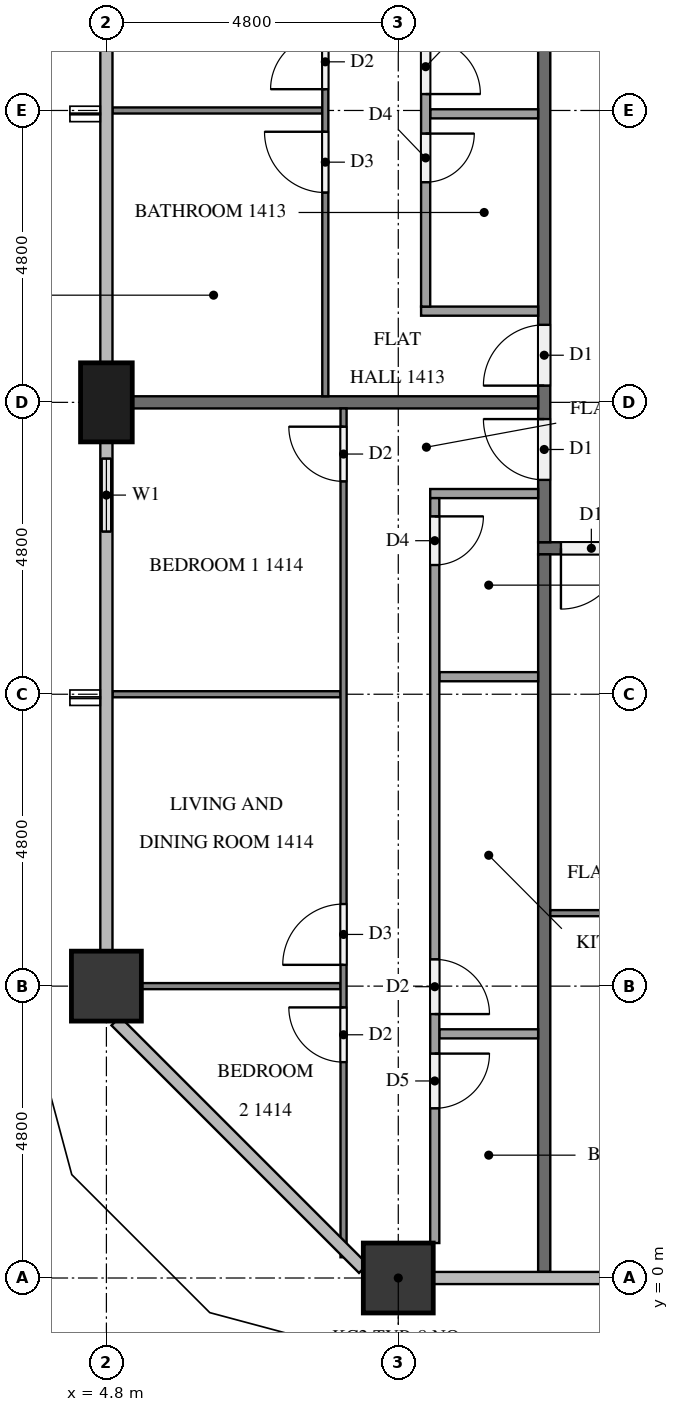
"""IFC4 building model, lengths in metres.
Left out: names, types, materials, properties, quantities, classifications, styles, units other than length and angle.
Written with IfcOpenShell. Run it as: python <this file> out.ifc"""

import sys

from ifc_helpers import new_model, si_unit, direction, frame, frame_2d, origin, origin_2d, place, context, subcontext, project, spatial, rectangle, extrude, element, fill, save


model = new_model("IFC4")
c1 = context("Model", 3, precision=1e-05, world=origin(), true_north=direction((0.0, 1.0)))
c2 = subcontext(c1, "Body", "Model", "MODEL_VIEW")
j1 = project(units=[si_unit("LENGTHUNIT", "METRE"), si_unit("PLANEANGLEUNIT", "RADIAN")], contexts=[c1])
p1 = place(None, origin())
s1 = spatial("IfcSite", under=j1, at=p1, CompositionType="ELEMENT")
p2 = place(p1, origin())
s2 = spatial("IfcBuilding", under=s1, at=p2, CompositionType="ELEMENT")
p3 = place(p2, frame((0.0, 0.0, 59.3)))
s3 = spatial("IfcBuildingStorey", under=s2, at=p3, CompositionType="ELEMENT", Elevation=59.3)
p4 = place(p3, frame((9.6, 0.0, 0.0), z_axis=(0.0, 0.0, 1.0), x_axis=(1.0, 0.0, 0.0)))
e1 = element("IfcColumn", 1, at=p4, inside=s3, PredefinedType="COLUMN", context=c2, shape_type="SweptSolid", body=[
    extrude(rectangle(XDim=1.15, YDim=1.15, at=origin_2d()), origin(), (0.0, 0.0, 1.0), 3.2),
])
p5 = place(p3, frame((4.8, 14.4, 0.0), z_axis=(0.0, 0.0, 1.0), x_axis=(0.0, 1.0, 0.0)))
e2 = element("IfcColumn", 2, at=p5, inside=s3, PredefinedType="COLUMN", context=c2, shape_type="SweptSolid", body=[
    extrude(rectangle(XDim=1.3, YDim=0.85, at=origin_2d()), origin(), (0.0, 0.0, 1.0), 3.2),
])
p6 = place(p3, frame((4.8, 4.8, 0.0), z_axis=(0.0, 0.0, 1.0), x_axis=(1.0, 0.0, 0.0)))
e3 = element("IfcColumn", 3, at=p6, inside=s3, PredefinedType="COLUMN", context=c2, shape_type="SweptSolid", body=[
    extrude(rectangle(XDim=1.15, YDim=1.15, at=origin_2d()), origin(), (0.0, 0.0, 1.0), 3.2),
])
p7 = place(p3, frame((4.8, 13.75, 0.0), z_axis=(0.0, 0.0, 1.0), x_axis=(0.0, -1.0, 0.0)))
e4 = element("IfcWall", 4, at=p7, inside=s3, PredefinedType="SOLIDWALL", context=c2, shape_type="SweptSolid", body=[
    extrude(rectangle(XDim=1.75, YDim=0.15, at=frame_2d((0.875, 0.0))), origin(), (0.0, 0.0, 1.0), 3.2),
])
p8 = place(p7, frame((0.275, 0.0, 0.9)))
e5 = element("IfcOpeningElement", 5, at=p8, cuts=e4, PredefinedType="OPENING", context=c2, shape_type="SweptSolid", body=[
    extrude(rectangle(XDim=1.2, YDim=1.4, at=frame_2d((0.6, 0.7))), frame((0.0, 0.085, 0.0), z_axis=(0.0, -1.0, 0.0), x_axis=(1.0, 0.0, 0.0)), (0.0, 0.0, 1.0), 0.17),
])
p9 = place(p3, frame((50.5, 12.0, 0.0), z_axis=(0.0, 0.0, 1.0), x_axis=(-1.0, 0.0, 0.0)))
e6 = element("IfcWall", 6, at=p9, inside=s3, PredefinedType="PARTITIONING", context=c2, shape_type="SweptSolid", body=[
    extrude(rectangle(XDim=38.6, YDim=0.2, at=frame_2d((19.3, 0.0))), origin(), (0.0, 0.0, 1.0), 3.2),
])
p10 = place(p9, frame((37.225, 0.0, 0.0)))
e7 = element("IfcOpeningElement", 7, at=p10, cuts=e6, PredefinedType="OPENING", context=c2, shape_type="SweptSolid", body=[
    extrude(rectangle(XDim=1.0, YDim=2.1, at=frame_2d((0.5, 1.05))), frame((0.0, 0.11, 0.0), z_axis=(0.0, -1.0, 0.0), x_axis=(1.0, 0.0, 0.0)), (0.0, 0.0, 1.0), 0.22),
])
p11 = place(p9, frame((22.825, 0.0, 0.0)))
e8 = element("IfcOpeningElement", 8, at=p11, cuts=e6, PredefinedType="OPENING", context=c2, shape_type="SweptSolid", body=[
    extrude(rectangle(XDim=1.0, YDim=2.1, at=frame_2d((0.5, 1.05))), frame((0.0, 0.11, 0.0), z_axis=(0.0, -1.0, 0.0), x_axis=(1.0, 0.0, 0.0)), (0.0, 0.0, 1.0), 0.22),
])
p12 = place(p9, frame((0.375, 0.0, 0.0)))
e9 = element("IfcOpeningElement", 9, at=p12, cuts=e6, PredefinedType="OPENING", context=c2, shape_type="SweptSolid", body=[
    extrude(rectangle(XDim=1.0, YDim=2.1, at=frame_2d((0.5, 1.05))), frame((0.0, 0.11, 0.0), z_axis=(0.0, -1.0, 0.0), x_axis=(1.0, 0.0, 0.0)), (0.0, 0.0, 1.0), 0.22),
])
p13 = place(p3, frame((12.0, 12.1, 0.0), z_axis=(0.0, 0.0, 1.0), x_axis=(0.0, 1.0, 0.0)))
e10 = element("IfcWall", 10, at=p13, inside=s3, PredefinedType="PARTITIONING", context=c2, shape_type="SweptSolid", body=[
    extrude(rectangle(XDim=28.6, YDim=0.2, at=frame_2d((14.3, 0.0))), origin(), (0.0, 0.0, 1.0), 3.2),
])
p14 = place(p13, frame((19.375, 0.0, 0.0)))
e11 = element("IfcOpeningElement", 11, at=p14, cuts=e10, PredefinedType="OPENING", context=c2, shape_type="SweptSolid", body=[
    extrude(rectangle(XDim=1.0, YDim=2.1, at=frame_2d((0.5, 1.05))), frame((0.0, 0.11, 0.0), z_axis=(0.0, -1.0, 0.0), x_axis=(1.0, 0.0, 0.0)), (0.0, 0.0, 1.0), 0.22),
])
p15 = place(p13, frame((12.175, 0.0, 0.0)))
e12 = element("IfcOpeningElement", 12, at=p15, cuts=e10, PredefinedType="OPENING", context=c2, shape_type="SweptSolid", body=[
    extrude(rectangle(XDim=1.0, YDim=2.1, at=frame_2d((0.5, 1.05))), frame((0.0, 0.11, 0.0), z_axis=(0.0, -1.0, 0.0), x_axis=(1.0, 0.0, 0.0)), (0.0, 0.0, 1.0), 0.22),
])
p16 = place(p13, frame((2.575, 0.0, 0.0)))
e13 = element("IfcOpeningElement", 13, at=p16, cuts=e10, PredefinedType="OPENING", context=c2, shape_type="SweptSolid", body=[
    extrude(rectangle(XDim=1.0, YDim=2.1, at=frame_2d((0.5, 1.05))), frame((0.0, 0.11, 0.0), z_axis=(0.0, -1.0, 0.0), x_axis=(1.0, 0.0, 0.0)), (0.0, 0.0, 1.0), 0.22),
])
p17 = place(p13, frame((1.025, 0.0, 0.0)))
e14 = element("IfcOpeningElement", 14, at=p17, cuts=e10, PredefinedType="OPENING", context=c2, shape_type="SweptSolid", body=[
    extrude(rectangle(XDim=1.0, YDim=2.1, at=frame_2d((0.5, 1.05))), frame((0.0, 0.11, 0.0), z_axis=(0.0, -1.0, 0.0), x_axis=(1.0, 0.0, 0.0)), (0.0, 0.0, 1.0), 0.22),
])
p18 = place(p3, frame((12.0, 0.1, 0.0), z_axis=(0.0, 0.0, 1.0), x_axis=(0.0, 1.0, 0.0)))
e15 = element("IfcWall", 15, at=p18, inside=s3, PredefinedType="PARTITIONING", context=c2, shape_type="SweptSolid", body=[
    extrude(rectangle(XDim=11.8, YDim=0.2, at=frame_2d((5.9, 0.0))), origin(), (0.0, 0.0, 1.0), 3.2),
])
p19 = place(p3, frame((5.225, 14.4, 0.0), z_axis=(0.0, 0.0, 1.0), x_axis=(1.0, 0.0, 0.0)))
e16 = element("IfcWall", 16, at=p19, inside=s3, PredefinedType="PARTITIONING", context=c2, shape_type="SweptSolid", body=[
    extrude(rectangle(XDim=6.675, YDim=0.2, at=frame_2d((3.337, 0.0))), origin(), (0.0, 0.0, 1.0), 3.2),
])
p20 = place(p3, frame((26.3, 6.0, 0.0), z_axis=(0.0, 0.0, 1.0), x_axis=(-1.0, 0.0, 0.0)))
e17 = element("IfcWall", 17, at=p20, inside=s3, PredefinedType="PARTITIONING", context=c2, shape_type="SweptSolid", body=[
    extrude(rectangle(XDim=14.2, YDim=0.1, at=frame_2d((7.1, 0.0))), origin(), (0.0, 0.0, 1.0), 3.2),
])
p21 = place(p20, frame((9.85, 0.0, 0.0)))
e18 = element("IfcOpeningElement", 18, at=p21, cuts=e17, PredefinedType="OPENING", context=c2, shape_type="SweptSolid", body=[
    extrude(rectangle(XDim=0.9, YDim=2.1, at=frame_2d((0.45, 1.05))), frame((0.0, 0.06, 0.0), z_axis=(0.0, -1.0, 0.0), x_axis=(1.0, 0.0, 0.0)), (0.0, 0.0, 1.0), 0.12),
])
p22 = place(p20, frame((8.15, 0.0, 0.0)))
e19 = element("IfcOpeningElement", 19, at=p22, cuts=e17, PredefinedType="OPENING", context=c2, shape_type="SweptSolid", body=[
    extrude(rectangle(XDim=1.0, YDim=2.1, at=frame_2d((0.5, 1.05))), frame((0.0, 0.06, 0.0), z_axis=(0.0, -1.0, 0.0), x_axis=(1.0, 0.0, 0.0)), (0.0, 0.0, 1.0), 0.12),
])
p23 = place(p20, frame((0.3, 0.0, 0.0)))
e20 = element("IfcOpeningElement", 20, at=p23, cuts=e17, PredefinedType="OPENING", context=c2, shape_type="SweptSolid", body=[
    extrude(rectangle(XDim=0.9, YDim=2.1, at=frame_2d((0.45, 1.05))), frame((0.0, 0.06, 0.0), z_axis=(0.0, -1.0, 0.0), x_axis=(1.0, 0.0, 0.0)), (0.0, 0.0, 1.0), 0.12),
])
p24 = place(p3, frame((8.35, 19.2, 0.0), z_axis=(0.0, 0.0, 1.0), x_axis=(-1.0, 0.0, 0.0)))
e21 = element("IfcWall", 21, at=p24, inside=s3, PredefinedType="PARTITIONING", context=c2, shape_type="SweptSolid", body=[
    extrude(rectangle(XDim=3.45, YDim=0.1, at=frame_2d((1.725, 0.0))), origin(), (0.0, 0.0, 1.0), 3.2),
])
p25 = place(p3, frame((8.4, 14.5, 0.0), z_axis=(0.0, 0.0, 1.0), x_axis=(0.0, 1.0, 0.0)))
e22 = element("IfcWall", 22, at=p25, inside=s3, PredefinedType="PARTITIONING", context=c2, shape_type="SweptSolid", body=[
    extrude(rectangle(XDim=9.4, YDim=0.1, at=frame_2d((4.7, 0.0))), origin(), (0.0, 0.0, 1.0), 3.2),
])
p26 = place(p25, frame((3.35, 0.0, 0.0)))
e23 = element("IfcOpeningElement", 23, at=p26, cuts=e22, PredefinedType="OPENING", context=c2, shape_type="SweptSolid", body=[
    extrude(rectangle(XDim=1.0, YDim=2.1, at=frame_2d((0.5, 1.05))), frame((0.0, 0.06, 0.0), z_axis=(0.0, -1.0, 0.0), x_axis=(1.0, 0.0, 0.0)), (0.0, 0.0, 1.0), 0.12),
])
p27 = place(p25, frame((5.05, 0.0, 0.0)))
e24 = element("IfcOpeningElement", 24, at=p27, cuts=e22, PredefinedType="OPENING", context=c2, shape_type="SweptSolid", body=[
    extrude(rectangle(XDim=0.9, YDim=2.1, at=frame_2d((0.45, 1.05))), frame((0.0, 0.06, 0.0), z_axis=(0.0, -1.0, 0.0), x_axis=(1.0, 0.0, 0.0)), (0.0, 0.0, 1.0), 0.12),
])
p28 = place(p3, frame((11.9, 19.145, 0.0), z_axis=(0.0, 0.0, 1.0), x_axis=(-1.0, 0.0, 0.0)))
e25 = element("IfcWall", 25, at=p28, inside=s3, PredefinedType="PARTITIONING", context=c2, shape_type="SweptSolid", body=[
    extrude(rectangle(XDim=1.775, YDim=0.15, at=frame_2d((0.887, 0.0))), origin(), (0.0, 0.0, 1.0), 3.2),
])
p29 = place(p3, frame((11.9, 15.9, 0.0), z_axis=(0.0, 0.0, 1.0), x_axis=(-1.0, 0.0, 0.0)))
e26 = element("IfcWall", 26, at=p29, inside=s3, PredefinedType="PARTITIONING", context=c2, shape_type="SweptSolid", body=[
    extrude(rectangle(XDim=1.925, YDim=0.15, at=frame_2d((0.962, 0.0))), origin(), (0.0, 0.0, 1.0), 3.2),
])
p30 = place(p3, frame((10.05, 23.9, 0.0), z_axis=(0.0, 0.0, 1.0), x_axis=(0.0, -1.0, 0.0)))
e27 = element("IfcWall", 27, at=p30, inside=s3, PredefinedType="PARTITIONING", context=c2, shape_type="SweptSolid", body=[
    extrude(rectangle(XDim=7.925, YDim=0.15, at=frame_2d((3.962, 0.0))), origin(), (0.0, 0.0, 1.0), 3.2),
])
p31 = place(p30, frame((5.08, 0.0, 0.0)))
e28 = element("IfcOpeningElement", 28, at=p31, cuts=e27, PredefinedType="OPENING", context=c2, shape_type="SweptSolid", body=[
    extrude(rectangle(XDim=0.8, YDim=2.1, at=frame_2d((0.4, 1.05))), frame((0.0, 0.085, 0.0), z_axis=(0.0, -1.0, 0.0), x_axis=(1.0, 0.0, 0.0)), (0.0, 0.0, 1.0), 0.17),
])
p32 = place(p30, frame((3.53, 0.0, 0.0)))
e29 = element("IfcOpeningElement", 29, at=p32, cuts=e27, PredefinedType="OPENING", context=c2, shape_type="SweptSolid", body=[
    extrude(rectangle(XDim=0.9, YDim=2.1, at=frame_2d((0.45, 1.05))), frame((0.0, 0.085, 0.0), z_axis=(0.0, -1.0, 0.0), x_axis=(1.0, 0.0, 0.0)), (0.0, 0.0, 1.0), 0.17),
])
p33 = place(p3, frame((8.65, 9.6, 0.0), z_axis=(0.0, 0.0, 1.0), x_axis=(-1.0, 0.0, 0.0)))
e30 = element("IfcWall", 30, at=p33, inside=s3, PredefinedType="PARTITIONING", context=c2, shape_type="SweptSolid", body=[
    extrude(rectangle(XDim=3.75, YDim=0.1, at=frame_2d((1.875, 0.0))), origin(), (0.0, 0.0, 1.0), 3.2),
])
p34 = place(p3, frame((8.65, 4.8, 0.0), z_axis=(0.0, 0.0, 1.0), x_axis=(-1.0, 0.0, 0.0)))
e31 = element("IfcWall", 31, at=p34, inside=s3, PredefinedType="PARTITIONING", context=c2, shape_type="SweptSolid", body=[
    extrude(rectangle(XDim=3.275, YDim=0.1, at=frame_2d((1.637, 0.0))), origin(), (0.0, 0.0, 1.0), 3.2),
])
p35 = place(p3, frame((8.7, 0.341, 0.0), z_axis=(0.0, 0.0, 1.0), x_axis=(0.0, 1.0, 0.0)))
e32 = element("IfcWall", 32, at=p35, inside=s3, PredefinedType="PARTITIONING", context=c2, shape_type="SweptSolid", body=[
    extrude(rectangle(XDim=13.959, YDim=0.1, at=frame_2d((6.979, 0.0))), origin(), (0.0, 0.0, 1.0), 3.2),
])
p36 = place(p35, frame((12.759, 0.0, 0.0)))
e33 = element("IfcOpeningElement", 33, at=p36, cuts=e32, PredefinedType="OPENING", context=c2, shape_type="SweptSolid", body=[
    extrude(rectangle(XDim=0.9, YDim=2.1, at=frame_2d((0.45, 1.05))), frame((0.0, 0.06, 0.0), z_axis=(0.0, -1.0, 0.0), x_axis=(1.0, 0.0, 0.0)), (0.0, 0.0, 1.0), 0.12),
])
p37 = place(p35, frame((4.809, 0.0, 0.0)))
e34 = element("IfcOpeningElement", 34, at=p37, cuts=e32, PredefinedType="OPENING", context=c2, shape_type="SweptSolid", body=[
    extrude(rectangle(XDim=1.0, YDim=2.1, at=frame_2d((0.5, 1.05))), frame((0.0, 0.06, 0.0), z_axis=(0.0, -1.0, 0.0), x_axis=(1.0, 0.0, 0.0)), (0.0, 0.0, 1.0), 0.12),
])
p38 = place(p35, frame((3.209, 0.0, 0.0)))
e35 = element("IfcOpeningElement", 35, at=p38, cuts=e32, PredefinedType="OPENING", context=c2, shape_type="SweptSolid", body=[
    extrude(rectangle(XDim=0.9, YDim=2.1, at=frame_2d((0.45, 1.05))), frame((0.0, 0.06, 0.0), z_axis=(0.0, -1.0, 0.0), x_axis=(1.0, 0.0, 0.0)), (0.0, 0.0, 1.0), 0.12),
])
for number, where, z_axis, x_axis in (
    (36, (11.9, 9.888, 0.0), (0.0, 0.0, 1.0), (-1.0, 0.0, 0.0)),
    (37, (11.9, 4.015, 0.0), (0.0, 0.0, 1.0), (-1.0, 0.0, 0.0)),
):
    element("IfcWall", number, at=place(p3, frame(where, z_axis=z_axis, x_axis=x_axis)), inside=s3, PredefinedType="PARTITIONING", context=c2, shape_type="SweptSolid", body=[
        extrude(rectangle(XDim=1.625, YDim=0.15, at=frame_2d((0.812, 0.0))), origin(), (0.0, 0.0, 1.0), 3.2),
    ])
p39 = place(p3, frame((11.9, 12.9, 0.0), z_axis=(0.0, 0.0, 1.0), x_axis=(-1.0, 0.0, 0.0)))
e38 = element("IfcWall", 38, at=p39, inside=s3, PredefinedType="PARTITIONING", context=c2, shape_type="SweptSolid", body=[
    extrude(rectangle(XDim=1.775, YDim=0.15, at=frame_2d((0.887, 0.0))), origin(), (0.0, 0.0, 1.0), 3.2),
])
p40 = place(p3, frame((10.2, 12.825, 0.0), z_axis=(0.0, 0.0, 1.0), x_axis=(0.0, -1.0, 0.0)))
e39 = element("IfcWall", 39, at=p40, inside=s3, PredefinedType="PARTITIONING", context=c2, shape_type="SweptSolid", body=[
    extrude(rectangle(XDim=12.25, YDim=0.15, at=frame_2d((6.125, 0.0))), origin(), (0.0, 0.0, 1.0), 3.2),
])
p41 = place(p40, frame((0.3, 0.0, 0.0)))
e40 = element("IfcOpeningElement", 40, at=p41, cuts=e39, PredefinedType="OPENING", context=c2, shape_type="SweptSolid", body=[
    extrude(rectangle(XDim=0.8, YDim=2.1, at=frame_2d((0.4, 1.05))), frame((0.0, 0.085, 0.0), z_axis=(0.0, -1.0, 0.0), x_axis=(1.0, 0.0, 0.0)), (0.0, 0.0, 1.0), 0.17),
])
p42 = place(p40, frame((7.585, 0.0, 0.0)))
e41 = element("IfcOpeningElement", 41, at=p42, cuts=e39, PredefinedType="OPENING", context=c2, shape_type="SweptSolid", body=[
    extrude(rectangle(XDim=0.9, YDim=2.1, at=frame_2d((0.45, 1.05))), frame((0.0, 0.085, 0.0), z_axis=(0.0, -1.0, 0.0), x_axis=(1.0, 0.0, 0.0)), (0.0, 0.0, 1.0), 0.17),
])
p43 = place(p40, frame((9.135, 0.0, 0.0)))
e42 = element("IfcOpeningElement", 42, at=p43, cuts=e39, PredefinedType="OPENING", context=c2, shape_type="SweptSolid", body=[
    extrude(rectangle(XDim=0.9, YDim=2.1, at=frame_2d((0.45, 1.05))), frame((0.0, 0.085, 0.0), z_axis=(0.0, -1.0, 0.0), x_axis=(1.0, 0.0, 0.0)), (0.0, 0.0, 1.0), 0.17),
])
p44 = place(p8, origin())
e43 = element("IfcWindow", 43, at=p44, inside=s3, PartitioningType="SINGLE_PANEL", PredefinedType="WINDOW", context=c2, shape_type="SweptSolid", body=[
    extrude(rectangle(XDim=1.2, YDim=1.4, at=frame_2d((0.6, 0.7))), frame((0.0, 0.03, 0.0), z_axis=(0.0, -1.0, 0.0), x_axis=(1.0, 0.0, 0.0)), (0.0, 0.0, 1.0), 0.06),
])
fill(e5, e43)
p45 = place(p10, origin())
e44 = element("IfcDoor", 44, at=p45, inside=s3, OperationType="SINGLE_SWING_RIGHT", PredefinedType="DOOR", context=c2, shape_type="SweptSolid", body=[
    extrude(rectangle(XDim=1.0, YDim=2.1, at=frame_2d((0.5, 1.05))), frame((0.0, 0.025, 0.0), z_axis=(0.0, -1.0, 0.0), x_axis=(1.0, 0.0, 0.0)), (0.0, 0.0, 1.0), 0.05),
])
fill(e7, e44)
p46 = place(p16, origin())
e45 = element("IfcDoor", 45, at=p46, inside=s3, OperationType="SINGLE_SWING_LEFT", PredefinedType="DOOR", context=c2, shape_type="SweptSolid", body=[
    extrude(rectangle(XDim=1.0, YDim=2.1, at=frame_2d((0.5, 1.05))), frame((0.0, 0.025, 0.0), z_axis=(0.0, -1.0, 0.0), x_axis=(1.0, 0.0, 0.0)), (0.0, 0.0, 1.0), 0.05),
])
fill(e13, e45)
p47 = place(p17, origin())
e46 = element("IfcDoor", 46, at=p47, inside=s3, OperationType="SINGLE_SWING_RIGHT", PredefinedType="DOOR", context=c2, shape_type="SweptSolid", body=[
    extrude(rectangle(XDim=1.0, YDim=2.1, at=frame_2d((0.5, 1.05))), frame((0.0, 0.025, 0.0), z_axis=(0.0, -1.0, 0.0), x_axis=(1.0, 0.0, 0.0)), (0.0, 0.0, 1.0), 0.05),
])
fill(e14, e46)
p48 = place(p26, origin())
e47 = element("IfcDoor", 47, at=p48, inside=s3, OperationType="SINGLE_SWING_RIGHT", PredefinedType="DOOR", context=c2, shape_type="SweptSolid", body=[
    extrude(rectangle(XDim=1.0, YDim=2.1, at=frame_2d((0.5, 1.05))), frame((0.0, 0.025, 0.0), z_axis=(0.0, -1.0, 0.0), x_axis=(1.0, 0.0, 0.0)), (0.0, 0.0, 1.0), 0.05),
])
fill(e23, e47)
p49 = place(p27, origin())
e48 = element("IfcDoor", 48, at=p49, inside=s3, OperationType="SINGLE_SWING_LEFT", PredefinedType="DOOR", context=c2, shape_type="SweptSolid", body=[
    extrude(rectangle(XDim=0.9, YDim=2.1, at=frame_2d((0.45, 1.05))), frame((0.0, 0.025, 0.0), z_axis=(0.0, -1.0, 0.0), x_axis=(1.0, 0.0, 0.0)), (0.0, 0.0, 1.0), 0.05),
])
fill(e24, e48)
p50 = place(p31, origin())
e49 = element("IfcDoor", 49, at=p50, inside=s3, OperationType="SINGLE_SWING_LEFT", PredefinedType="DOOR", context=c2, shape_type="SweptSolid", body=[
    extrude(rectangle(XDim=0.8, YDim=2.1, at=frame_2d((0.4, 1.05))), frame((0.0, 0.025, 0.0), z_axis=(0.0, -1.0, 0.0), x_axis=(1.0, 0.0, 0.0)), (0.0, 0.0, 1.0), 0.05),
])
fill(e28, e49)
p51 = place(p32, origin())
e50 = element("IfcDoor", 50, at=p51, inside=s3, OperationType="SINGLE_SWING_RIGHT", PredefinedType="DOOR", context=c2, shape_type="SweptSolid", body=[
    extrude(rectangle(XDim=0.9, YDim=2.1, at=frame_2d((0.45, 1.05))), frame((0.0, 0.025, 0.0), z_axis=(0.0, -1.0, 0.0), x_axis=(1.0, 0.0, 0.0)), (0.0, 0.0, 1.0), 0.05),
])
fill(e29, e50)
p52 = place(p36, origin())
e51 = element("IfcDoor", 51, at=p52, inside=s3, OperationType="SINGLE_SWING_RIGHT", PredefinedType="DOOR", context=c2, shape_type="SweptSolid", body=[
    extrude(rectangle(XDim=0.9, YDim=2.1, at=frame_2d((0.45, 1.05))), frame((0.0, 0.025, 0.0), z_axis=(0.0, -1.0, 0.0), x_axis=(1.0, 0.0, 0.0)), (0.0, 0.0, 1.0), 0.05),
])
fill(e33, e51)
p53 = place(p37, origin())
e52 = element("IfcDoor", 52, at=p53, inside=s3, OperationType="SINGLE_SWING_LEFT", PredefinedType="DOOR", context=c2, shape_type="SweptSolid", body=[
    extrude(rectangle(XDim=1.0, YDim=2.1, at=frame_2d((0.5, 1.05))), frame((0.0, 0.025, 0.0), z_axis=(0.0, -1.0, 0.0), x_axis=(1.0, 0.0, 0.0)), (0.0, 0.0, 1.0), 0.05),
])
fill(e34, e52)
p54 = place(p38, origin())
e53 = element("IfcDoor", 53, at=p54, inside=s3, OperationType="SINGLE_SWING_RIGHT", PredefinedType="DOOR", context=c2, shape_type="SweptSolid", body=[
    extrude(rectangle(XDim=0.9, YDim=2.1, at=frame_2d((0.45, 1.05))), frame((0.0, 0.025, 0.0), z_axis=(0.0, -1.0, 0.0), x_axis=(1.0, 0.0, 0.0)), (0.0, 0.0, 1.0), 0.05),
])
fill(e35, e53)
p55 = place(p41, origin())
e54 = element("IfcDoor", 54, at=p55, inside=s3, OperationType="SINGLE_SWING_LEFT", PredefinedType="DOOR", context=c2, shape_type="SweptSolid", body=[
    extrude(rectangle(XDim=0.8, YDim=2.1, at=frame_2d((0.4, 1.05))), frame((0.0, 0.025, 0.0), z_axis=(0.0, -1.0, 0.0), x_axis=(1.0, 0.0, 0.0)), (0.0, 0.0, 1.0), 0.05),
])
fill(e40, e54)
p56 = place(p42, origin())
e55 = element("IfcDoor", 55, at=p56, inside=s3, OperationType="SINGLE_SWING_RIGHT", PredefinedType="DOOR", context=c2, shape_type="SweptSolid", body=[
    extrude(rectangle(XDim=0.9, YDim=2.1, at=frame_2d((0.45, 1.05))), frame((0.0, 0.025, 0.0), z_axis=(0.0, -1.0, 0.0), x_axis=(1.0, 0.0, 0.0)), (0.0, 0.0, 1.0), 0.05),
])
fill(e41, e55)
p57 = place(p43, origin())
e56 = element("IfcDoor", 56, at=p57, inside=s3, OperationType="SINGLE_SWING_LEFT", PredefinedType="DOOR", context=c2, shape_type="SweptSolid", body=[
    extrude(rectangle(XDim=0.9, YDim=2.1, at=frame_2d((0.45, 1.05))), frame((0.0, 0.025, 0.0), z_axis=(0.0, -1.0, 0.0), x_axis=(1.0, 0.0, 0.0)), (0.0, 0.0, 1.0), 0.05),
])
fill(e42, e56)
save(model, sys.argv[1])
